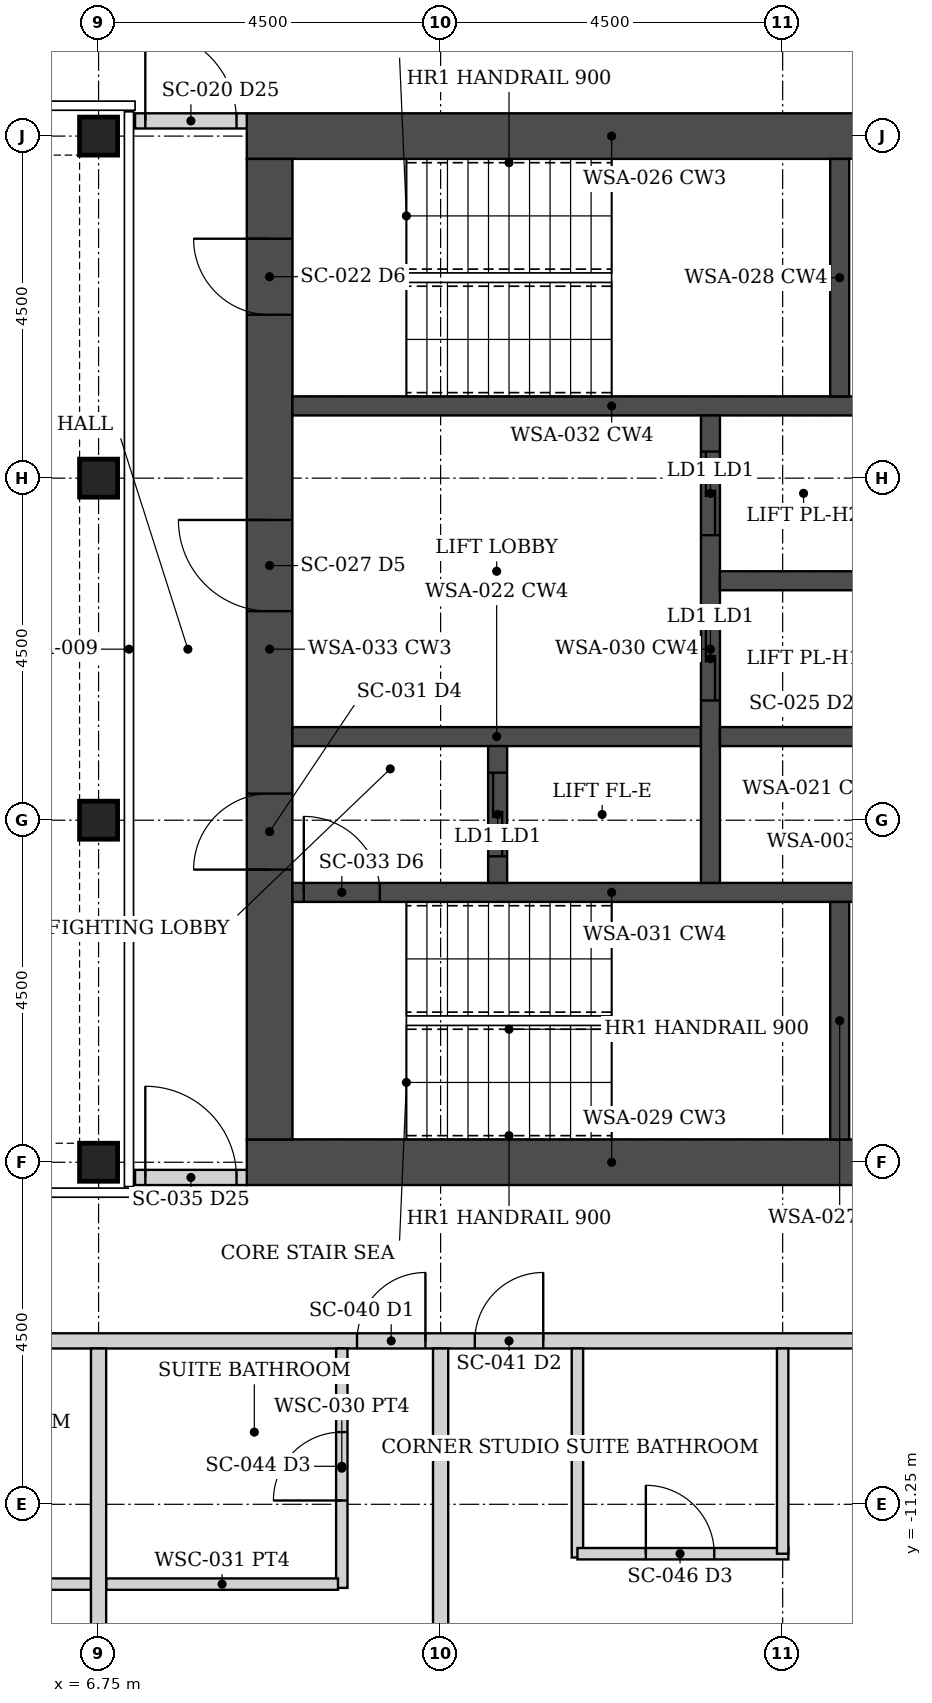
"""IFC4 building model, lengths in metres.
Left out: names, types, materials, properties, quantities, classifications, styles, units other than length and angle.
Written with IfcOpenShell. Run it as: python <this file> out.ifc"""

import sys

from ifc_helpers import new_model, si_unit, direction, frame, frame_2d, origin, origin_2d, place, context, subcontext, project, spatial, rectangle, hollow_rectangle, extrude, element, fill, save


model = new_model("IFC4")
c1 = context("Model", 3, precision=1e-05, world=origin(), true_north=direction((0.0, 1.0)))
c2 = subcontext(c1, "Body", "Model", "MODEL_VIEW")
j1 = project(units=[si_unit("LENGTHUNIT", "METRE"), si_unit("PLANEANGLEUNIT", "RADIAN")], contexts=[c1])
p1 = place(None, origin())
s1 = spatial("IfcSite", under=j1, at=p1, CompositionType="ELEMENT")
p2 = place(p1, origin())
s2 = spatial("IfcBuilding", under=s1, at=p2, CompositionType="ELEMENT")
p3 = place(p2, frame((0.0, 0.0, 223.3)))
s3 = spatial("IfcBuildingStorey", under=s2, at=p3, CompositionType="ELEMENT", Elevation=223.3)
for number, where, z_axis, x_axis in (
    (1, (6.75, -6.75, 0.0), (0.0, 0.0, 1.0), (1.0, 0.0, 0.0)),
    (2, (6.75, -2.25, 0.0), (0.0, 0.0, 1.0), (1.0, 0.0, 0.0)),
    (3, (6.75, 2.25, 0.0), (0.0, 0.0, 1.0), (1.0, 0.0, 0.0)),
    (4, (6.75, 6.75, 0.0), (0.0, 0.0, 1.0), (1.0, 0.0, 0.0)),
):
    element("IfcColumn", number, at=place(p3, frame(where, z_axis=z_axis, x_axis=x_axis)), inside=s3, PredefinedType="COLUMN", context=c2, shape_type="SweptSolid", body=[
        extrude(hollow_rectangle(XDim=0.5, YDim=0.5, WallThickness=0.03, at=origin_2d()), origin(), (0.0, 0.0, 1.0), 3.75),
    ])
for number, where, z_axis, x_axis in (
    (5, (8.7, -6.75, 0.0), (0.0, 0.0, 1.0), (1.0, 0.0, 0.0)),
    (6, (8.7, 6.75, 0.0), (0.0, 0.0, 1.0), (1.0, 0.0, 0.0)),
):
    element("IfcWall", number, at=place(p3, frame(where, z_axis=z_axis, x_axis=x_axis)), inside=s3, PredefinedType="SHEAR", context=c2, shape_type="SweptSolid", body=[
        extrude(rectangle(XDim=9.6, YDim=0.6, at=frame_2d((4.8, 0.0))), origin(), (0.0, 0.0, 1.0), 3.75),
    ])
p4 = place(p3, frame((9.0, -6.45, 0.0), z_axis=(0.0, 0.0, 1.0), x_axis=(0.0, 1.0, 0.0)))
e7 = element("IfcWall", 7, at=p4, inside=s3, PredefinedType="SHEAR", context=c2, shape_type="SweptSolid", body=[
    extrude(rectangle(XDim=12.9, YDim=0.6, at=frame_2d((6.45, 0.0))), origin(), (0.0, 0.0, 1.0), 3.75),
])
p5 = place(p4, frame((3.55, 0.0, 0.0)))
e8 = element("IfcOpeningElement", 8, at=p5, cuts=e7, PredefinedType="OPENING", context=c2, shape_type="SweptSolid", body=[
    extrude(rectangle(XDim=1.0, YDim=2.1, at=frame_2d((0.5, 1.05))), frame((0.0, 0.31, 0.0), z_axis=(0.0, -1.0, 0.0), x_axis=(1.0, 0.0, 0.0)), (0.0, 0.0, 1.0), 0.62),
])
p6 = place(p4, frame((6.95, 0.0, 0.0)))
e9 = element("IfcOpeningElement", 9, at=p6, cuts=e7, PredefinedType="OPENING", context=c2, shape_type="SweptSolid", body=[
    extrude(rectangle(XDim=1.2, YDim=2.1, at=frame_2d((0.6, 1.05))), frame((0.0, 0.31, 0.0), z_axis=(0.0, -1.0, 0.0), x_axis=(1.0, 0.0, 0.0)), (0.0, 0.0, 1.0), 0.62),
])
p7 = place(p4, frame((10.85, 0.0, 0.0)))
e10 = element("IfcOpeningElement", 10, at=p7, cuts=e7, PredefinedType="OPENING", context=c2, shape_type="SweptSolid", body=[
    extrude(rectangle(XDim=1.0, YDim=2.1, at=frame_2d((0.5, 1.05))), frame((0.0, 0.31, 0.0), z_axis=(0.0, -1.0, 0.0), x_axis=(1.0, 0.0, 0.0)), (0.0, 0.0, 1.0), 0.62),
])
p8 = place(p3, frame((9.3, -3.2, 0.0), z_axis=(0.0, 0.0, 1.0), x_axis=(1.0, 0.0, 0.0)))
e11 = element("IfcWall", 11, at=p8, inside=s3, PredefinedType="SHEAR", context=c2, shape_type="SweptSolid", body=[
    extrude(rectangle(XDim=8.4, YDim=0.25, at=frame_2d((4.2, 0.0))), origin(), (0.0, 0.0, 1.0), 3.75),
])
p9 = place(p8, frame((0.15, 0.0, 0.0)))
e12 = element("IfcOpeningElement", 12, at=p9, cuts=e11, PredefinedType="OPENING", context=c2, shape_type="SweptSolid", body=[
    extrude(rectangle(XDim=1.0, YDim=2.1, at=frame_2d((0.5, 1.05))), frame((0.0, 0.135, 0.0), z_axis=(0.0, -1.0, 0.0), x_axis=(1.0, 0.0, 0.0)), (0.0, 0.0, 1.0), 0.27),
])
p10 = place(p3, frame((9.3, 3.2, 0.0), z_axis=(0.0, 0.0, 1.0), x_axis=(1.0, 0.0, 0.0)))
e13 = element("IfcWall", 13, at=p10, inside=s3, PredefinedType="SHEAR", context=c2, shape_type="SweptSolid", body=[
    extrude(rectangle(XDim=8.4, YDim=0.25, at=frame_2d((4.2, 0.0))), origin(), (0.0, 0.0, 1.0), 3.75),
])
for number, where, z_axis, x_axis in (
    (14, (16.5, -6.45, 0.0), (0.0, 0.0, 1.0), (0.0, 1.0, 0.0)),
    (15, (16.5, 3.325, 0.0), (0.0, 0.0, 1.0), (0.0, 1.0, 0.0)),
):
    element("IfcWall", number, at=place(p3, frame(where, z_axis=z_axis, x_axis=x_axis)), inside=s3, PredefinedType="SHEAR", context=c2, shape_type="SweptSolid", body=[
        extrude(rectangle(XDim=3.125, YDim=0.25, at=frame_2d((1.562, 0.0))), origin(), (0.0, 0.0, 1.0), 3.75),
    ])
p11 = place(p3, frame((9.3, -1.15, 0.0), z_axis=(0.0, 0.0, 1.0), x_axis=(1.0, 0.0, 0.0)))
e16 = element("IfcWall", 16, at=p11, inside=s3, PredefinedType="SHEAR", context=c2, shape_type="SweptSolid", body=[
    extrude(rectangle(XDim=5.375, YDim=0.25, at=frame_2d((2.688, 0.0))), origin(), (0.0, 0.0, 1.0), 3.75),
])
p12 = place(p3, frame((12.0, -3.075, 0.0), z_axis=(0.0, 0.0, 1.0), x_axis=(0.0, 1.0, 0.0)))
e17 = element("IfcWall", 17, at=p12, inside=s3, PredefinedType="SHEAR", context=c2, shape_type="SweptSolid", body=[
    extrude(rectangle(XDim=1.8, YDim=0.25, at=frame_2d((0.9, 0.0))), origin(), (0.0, 0.0, 1.0), 3.75),
])
p13 = place(p12, frame((0.35, 0.0, 0.0)))
e18 = element("IfcOpeningElement", 18, at=p13, cuts=e17, PredefinedType="OPENING", context=c2, shape_type="SweptSolid", body=[
    extrude(rectangle(XDim=1.1, YDim=2.1, at=frame_2d((0.55, 1.05))), frame((0.0, 0.135, 0.0), z_axis=(0.0, -1.0, 0.0), x_axis=(1.0, 0.0, 0.0)), (0.0, 0.0, 1.0), 0.27),
])
p14 = place(p3, frame((14.8, -3.075, 0.0), z_axis=(0.0, 0.0, 1.0), x_axis=(0.0, 1.0, 0.0)))
e19 = element("IfcWall", 19, at=p14, inside=s3, PredefinedType="SHEAR", context=c2, shape_type="SweptSolid", body=[
    extrude(rectangle(XDim=6.15, YDim=0.25, at=frame_2d((3.075, 0.0))), origin(), (0.0, 0.0, 1.0), 3.75),
])
p15 = place(p14, frame((2.4, 0.0, 0.0)))
e20 = element("IfcOpeningElement", 20, at=p15, cuts=e19, PredefinedType="OPENING", context=c2, shape_type="SweptSolid", body=[
    extrude(rectangle(XDim=1.1, YDim=2.1, at=frame_2d((0.55, 1.05))), frame((0.0, 0.135, 0.0), z_axis=(0.0, -1.0, 0.0), x_axis=(1.0, 0.0, 0.0)), (0.0, 0.0, 1.0), 0.27),
])
p16 = place(p14, frame((4.575, 0.0, 0.0)))
e21 = element("IfcOpeningElement", 21, at=p16, cuts=e19, PredefinedType="OPENING", context=c2, shape_type="SweptSolid", body=[
    extrude(rectangle(XDim=1.1, YDim=2.1, at=frame_2d((0.55, 1.05))), frame((0.0, 0.135, 0.0), z_axis=(0.0, -1.0, 0.0), x_axis=(1.0, 0.0, 0.0)), (0.0, 0.0, 1.0), 0.27),
])
for number, where, z_axis, x_axis in (
    (22, (14.925, -1.15, 0.0), (0.0, 0.0, 1.0), (1.0, 0.0, 0.0)),
    (23, (14.925, 0.9, 0.0), (0.0, 0.0, 1.0), (1.0, 0.0, 0.0)),
):
    element("IfcWall", number, at=place(p3, frame(where, z_axis=z_axis, x_axis=x_axis)), inside=s3, PredefinedType="SHEAR", context=c2, shape_type="SweptSolid", body=[
        extrude(rectangle(XDim=2.775, YDim=0.25, at=frame_2d((1.387, 0.0))), origin(), (0.0, 0.0, 1.0), 3.75),
    ])
p17 = place(p3, frame((7.23, 6.95, 0.0), z_axis=(0.0, 0.0, 1.0), x_axis=(1.0, 0.0, 0.0)))
e24 = element("IfcWall", 24, at=p17, inside=s3, PredefinedType="PARTITIONING", context=c2, shape_type="SweptSolid", body=[
    extrude(rectangle(XDim=1.47, YDim=0.2, at=frame_2d((0.735, 0.0))), origin(), (0.0, 0.0, 1.0), 2.629),
])
p18 = place(p17, frame((0.135, 0.0, 0.0)))
e25 = element("IfcOpeningElement", 25, at=p18, cuts=e24, PredefinedType="OPENING", context=c2, shape_type="SweptSolid", body=[
    extrude(rectangle(XDim=1.2, YDim=2.1, at=frame_2d((0.6, 1.05))), frame((0.0, 0.11, 0.0), z_axis=(0.0, -1.0, 0.0), x_axis=(1.0, 0.0, 0.0)), (0.0, 0.0, 1.0), 0.22),
])
p19 = place(p3, frame((7.23, -6.95, 0.0), z_axis=(0.0, 0.0, 1.0), x_axis=(1.0, 0.0, 0.0)))
e26 = element("IfcWall", 26, at=p19, inside=s3, PredefinedType="PARTITIONING", context=c2, shape_type="SweptSolid", body=[
    extrude(rectangle(XDim=1.47, YDim=0.2, at=frame_2d((0.735, 0.0))), origin(), (0.0, 0.0, 1.0), 2.629),
])
p20 = place(p19, frame((0.135, 0.0, 0.0)))
e27 = element("IfcOpeningElement", 27, at=p20, cuts=e26, PredefinedType="OPENING", context=c2, shape_type="SweptSolid", body=[
    extrude(rectangle(XDim=1.2, YDim=2.1, at=frame_2d((0.6, 1.05))), frame((0.0, 0.11, 0.0), z_axis=(0.0, -1.0, 0.0), x_axis=(1.0, 0.0, 0.0)), (0.0, 0.0, 1.0), 0.22),
])
p21 = place(p3, frame((-20.05, -9.1, 0.0), z_axis=(0.0, 0.0, 1.0), x_axis=(1.0, 0.0, 0.0)))
e28 = element("IfcWall", 28, at=p21, inside=s3, PredefinedType="PARTITIONING", context=c2, shape_type="SweptSolid", body=[
    extrude(rectangle(XDim=40.1, YDim=0.2, at=frame_2d((20.05, 0.0))), origin(), (0.0, 0.0, 1.0), 2.629),
])
p22 = place(p21, frame((13.6, 0.0, 0.0)))
e29 = element("IfcOpeningElement", 29, at=p22, cuts=e28, PredefinedType="OPENING", context=c2, shape_type="SweptSolid", body=[
    extrude(rectangle(XDim=0.9, YDim=2.1, at=frame_2d((0.45, 1.05))), frame((0.0, 0.11, 0.0), z_axis=(0.0, -1.0, 0.0), x_axis=(1.0, 0.0, 0.0)), (0.0, 0.0, 1.0), 0.22),
])
p23 = place(p21, frame((21.2, 0.0, 0.0)))
e30 = element("IfcOpeningElement", 30, at=p23, cuts=e28, PredefinedType="OPENING", context=c2, shape_type="SweptSolid", body=[
    extrude(rectangle(XDim=0.9, YDim=2.1, at=frame_2d((0.45, 1.05))), frame((0.0, 0.11, 0.0), z_axis=(0.0, -1.0, 0.0), x_axis=(1.0, 0.0, 0.0)), (0.0, 0.0, 1.0), 0.22),
])
p24 = place(p21, frame((22.5, 0.0, 0.0)))
e31 = element("IfcOpeningElement", 31, at=p24, cuts=e28, PredefinedType="OPENING", context=c2, shape_type="SweptSolid", body=[
    extrude(rectangle(XDim=0.9, YDim=2.1, at=frame_2d((0.45, 1.05))), frame((0.0, 0.11, 0.0), z_axis=(0.0, -1.0, 0.0), x_axis=(1.0, 0.0, 0.0)), (0.0, 0.0, 1.0), 0.22),
])
p25 = place(p21, frame((30.2, 0.0, 0.0)))
e32 = element("IfcOpeningElement", 32, at=p25, cuts=e28, PredefinedType="OPENING", context=c2, shape_type="SweptSolid", body=[
    extrude(rectangle(XDim=0.9, YDim=2.1, at=frame_2d((0.45, 1.05))), frame((0.0, 0.11, 0.0), z_axis=(0.0, -1.0, 0.0), x_axis=(1.0, 0.0, 0.0)), (0.0, 0.0, 1.0), 0.22),
])
p26 = place(p21, frame((31.75, 0.0, 0.0)))
e33 = element("IfcOpeningElement", 33, at=p26, cuts=e28, PredefinedType="OPENING", context=c2, shape_type="SweptSolid", body=[
    extrude(rectangle(XDim=0.9, YDim=2.1, at=frame_2d((0.45, 1.05))), frame((0.0, 0.11, 0.0), z_axis=(0.0, -1.0, 0.0), x_axis=(1.0, 0.0, 0.0)), (0.0, 0.0, 1.0), 0.22),
])
p27 = place(p21, frame((7.45, 0.0, 0.0)))
e34 = element("IfcOpeningElement", 34, at=p27, cuts=e28, PredefinedType="OPENING", context=c2, shape_type="SweptSolid", body=[
    extrude(rectangle(XDim=0.9, YDim=2.1, at=frame_2d((0.45, 1.05))), frame((0.0, 0.11, 0.0), z_axis=(0.0, -1.0, 0.0), x_axis=(1.0, 0.0, 0.0)), (0.0, 0.0, 1.0), 0.22),
])
p28 = place(p3, frame((3.6, -12.3, 0.0), z_axis=(0.0, 0.0, 1.0), x_axis=(1.0, 0.0, 0.0)))
e35 = element("IfcWall", 35, at=p28, inside=s3, PredefinedType="PARTITIONING", context=c2, shape_type="SweptSolid", body=[
    extrude(rectangle(XDim=3.05, YDim=0.15, at=frame_2d((1.525, 0.0))), origin(), (0.0, 0.0, 1.0), 2.629),
])
p29 = place(p3, frame((9.95, -12.35, 0.0), z_axis=(0.0, 0.0, 1.0), x_axis=(0.0, 1.0, 0.0)))
e36 = element("IfcWall", 36, at=p29, inside=s3, PredefinedType="PARTITIONING", context=c2, shape_type="SweptSolid", body=[
    extrude(rectangle(XDim=3.15, YDim=0.15, at=frame_2d((1.575, 0.0))), origin(), (0.0, 0.0, 1.0), 2.629),
])
p30 = place(p29, frame((1.15, 0.0, 0.0)))
e37 = element("IfcOpeningElement", 37, at=p30, cuts=e36, PredefinedType="OPENING", context=c2, shape_type="SweptSolid", body=[
    extrude(rectangle(XDim=0.9, YDim=2.1, at=frame_2d((0.45, 1.05))), frame((0.0, 0.085, 0.0), z_axis=(0.0, -1.0, 0.0), x_axis=(1.0, 0.0, 0.0)), (0.0, 0.0, 1.0), 0.17),
])
p31 = place(p3, frame((6.85, -12.3, 0.0), z_axis=(0.0, 0.0, 1.0), x_axis=(1.0, 0.0, 0.0)))
e38 = element("IfcWall", 38, at=p31, inside=s3, PredefinedType="PARTITIONING", context=c2, shape_type="SweptSolid", body=[
    extrude(rectangle(XDim=3.05, YDim=0.15, at=frame_2d((1.525, 0.0))), origin(), (0.0, 0.0, 1.0), 2.629),
])
for number, where, z_axis, x_axis in (
    (39, (6.75, -19.9, 0.0), (0.0, 0.0, 1.0), (0.0, 1.0, 0.0)),
    (40, (11.25, -19.9, 0.0), (0.0, 0.0, 1.0), (0.0, 1.0, 0.0)),
):
    element("IfcWall", number, at=place(p3, frame(where, z_axis=z_axis, x_axis=x_axis)), inside=s3, PredefinedType="PARTITIONING", context=c2, shape_type="SweptSolid", body=[
        extrude(rectangle(XDim=10.7, YDim=0.2, at=frame_2d((5.35, 0.0))), origin(), (0.0, 0.0, 1.0), 2.629),
    ])
p32 = place(p3, frame((13.05, -11.95, 0.0), z_axis=(0.0, 0.0, 1.0), x_axis=(0.0, 1.0, 0.0)))
e41 = element("IfcWall", 41, at=p32, inside=s3, PredefinedType="PARTITIONING", context=c2, shape_type="SweptSolid", body=[
    extrude(rectangle(XDim=2.75, YDim=0.15, at=frame_2d((1.375, 0.0))), origin(), (0.0, 0.0, 1.0), 2.629),
])
p33 = place(p3, frame((13.05, -11.9, 0.0), z_axis=(0.0, 0.0, 1.0), x_axis=(1.0, 0.0, 0.0)))
e42 = element("IfcWall", 42, at=p33, inside=s3, PredefinedType="PARTITIONING", context=c2, shape_type="SweptSolid", body=[
    extrude(rectangle(XDim=2.775, YDim=0.15, at=frame_2d((1.387, 0.0))), origin(), (0.0, 0.0, 1.0), 2.629),
])
p34 = place(p33, frame((0.9, 0.0, 0.0)))
e43 = element("IfcOpeningElement", 43, at=p34, cuts=e42, PredefinedType="OPENING", context=c2, shape_type="SweptSolid", body=[
    extrude(rectangle(XDim=0.9, YDim=2.1, at=frame_2d((0.45, 1.05))), frame((0.0, 0.085, 0.0), z_axis=(0.0, -1.0, 0.0), x_axis=(1.0, 0.0, 0.0)), (0.0, 0.0, 1.0), 0.17),
])
p35 = place(p3, frame((15.75, -11.9, 0.0), z_axis=(0.0, 0.0, 1.0), x_axis=(0.0, 1.0, 0.0)))
e44 = element("IfcWall", 44, at=p35, inside=s3, PredefinedType="PARTITIONING", context=c2, shape_type="SweptSolid", body=[
    extrude(rectangle(XDim=2.7, YDim=0.15, at=frame_2d((1.35, 0.0))), origin(), (0.0, 0.0, 1.0), 2.629),
])
p36 = place(p18, origin())
e45 = element("IfcDoor", 45, at=p36, inside=s3, OperationType="DOUBLE_DOOR_DOUBLE_SWING", PredefinedType="DOOR", context=c2, shape_type="SweptSolid", body=[
    extrude(rectangle(XDim=1.2, YDim=2.1, at=frame_2d((0.6, 1.05))), frame((0.0, 0.025, 0.0), z_axis=(0.0, -1.0, 0.0), x_axis=(1.0, 0.0, 0.0)), (0.0, 0.0, 1.0), 0.05),
])
fill(e25, e45)
p37 = place(p20, origin())
e46 = element("IfcDoor", 46, at=p37, inside=s3, OperationType="DOUBLE_DOOR_DOUBLE_SWING", PredefinedType="DOOR", context=c2, shape_type="SweptSolid", body=[
    extrude(rectangle(XDim=1.2, YDim=2.1, at=frame_2d((0.6, 1.05))), frame((0.0, 0.025, 0.0), z_axis=(0.0, -1.0, 0.0), x_axis=(1.0, 0.0, 0.0)), (0.0, 0.0, 1.0), 0.05),
])
fill(e27, e46)
p38 = place(p25, origin())
e47 = element("IfcDoor", 47, at=p38, inside=s3, OperationType="SINGLE_SWING_RIGHT", PredefinedType="DOOR", context=c2, shape_type="SweptSolid", body=[
    extrude(rectangle(XDim=0.9, YDim=2.1, at=frame_2d((0.45, 1.05))), frame((0.0, 0.025, 0.0), z_axis=(0.0, -1.0, 0.0), x_axis=(1.0, 0.0, 0.0)), (0.0, 0.0, 1.0), 0.05),
])
fill(e32, e47)
p39 = place(p30, origin())
e48 = element("IfcDoor", 48, at=p39, inside=s3, OperationType="SINGLE_SWING_LEFT", PredefinedType="DOOR", context=c2, shape_type="SweptSolid", body=[
    extrude(rectangle(XDim=0.9, YDim=2.1, at=frame_2d((0.45, 1.05))), frame((0.0, 0.025, 0.0), z_axis=(0.0, -1.0, 0.0), x_axis=(1.0, 0.0, 0.0)), (0.0, 0.0, 1.0), 0.05),
])
fill(e37, e48)
p40 = place(p26, origin())
e49 = element("IfcDoor", 49, at=p40, inside=s3, OperationType="SINGLE_SWING_RIGHT", PredefinedType="DOOR", context=c2, shape_type="SweptSolid", body=[
    extrude(rectangle(XDim=0.9, YDim=2.1, at=frame_2d((0.45, 1.05))), frame((0.0, 0.025, 0.0), z_axis=(0.0, -1.0, 0.0), x_axis=(1.0, 0.0, 0.0)), (0.0, 0.0, 1.0), 0.05),
])
fill(e33, e49)
p41 = place(p34, origin())
e50 = element("IfcDoor", 50, at=p41, inside=s3, OperationType="SINGLE_SWING_LEFT", PredefinedType="DOOR", context=c2, shape_type="SweptSolid", body=[
    extrude(rectangle(XDim=0.9, YDim=2.1, at=frame_2d((0.45, 1.05))), frame((0.0, 0.025, 0.0), z_axis=(0.0, -1.0, 0.0), x_axis=(1.0, 0.0, 0.0)), (0.0, 0.0, 1.0), 0.05),
])
fill(e43, e50)
p42 = place(p5, origin())
e51 = element("IfcDoor", 51, at=p42, inside=s3, OperationType="SINGLE_SWING_LEFT", PredefinedType="DOOR", context=c2, shape_type="SweptSolid", body=[
    extrude(rectangle(XDim=1.0, YDim=2.1, at=frame_2d((0.5, 1.05))), frame((0.0, 0.025, 0.0), z_axis=(0.0, -1.0, 0.0), x_axis=(1.0, 0.0, 0.0)), (0.0, 0.0, 1.0), 0.05),
])
fill(e8, e51)
p43 = place(p9, origin())
e52 = element("IfcDoor", 52, at=p43, inside=s3, OperationType="SINGLE_SWING_LEFT", PredefinedType="DOOR", context=c2, shape_type="SweptSolid", body=[
    extrude(rectangle(XDim=1.0, YDim=2.1, at=frame_2d((0.5, 1.05))), frame((0.0, 0.025, 0.0), z_axis=(0.0, -1.0, 0.0), x_axis=(1.0, 0.0, 0.0)), (0.0, 0.0, 1.0), 0.05),
])
fill(e12, e52)
p44 = place(p6, origin())
e53 = element("IfcDoor", 53, at=p44, inside=s3, OperationType="SINGLE_SWING_RIGHT", PredefinedType="DOOR", context=c2, shape_type="SweptSolid", body=[
    extrude(rectangle(XDim=1.2, YDim=2.1, at=frame_2d((0.6, 1.05))), frame((0.0, 0.025, 0.0), z_axis=(0.0, -1.0, 0.0), x_axis=(1.0, 0.0, 0.0)), (0.0, 0.0, 1.0), 0.05),
])
fill(e9, e53)
p45 = place(p7, origin())
e54 = element("IfcDoor", 54, at=p45, inside=s3, OperationType="SINGLE_SWING_RIGHT", PredefinedType="DOOR", context=c2, shape_type="SweptSolid", body=[
    extrude(rectangle(XDim=1.0, YDim=2.1, at=frame_2d((0.5, 1.05))), frame((0.0, 0.025, 0.0), z_axis=(0.0, -1.0, 0.0), x_axis=(1.0, 0.0, 0.0)), (0.0, 0.0, 1.0), 0.05),
])
fill(e10, e54)
p46 = place(p13, origin())
e55 = element("IfcDoor", 55, at=p46, inside=s3, OperationType="DOUBLE_DOOR_SLIDING", PredefinedType="DOOR", context=c2, shape_type="SweptSolid", body=[
    extrude(rectangle(XDim=1.1, YDim=2.1, at=frame_2d((0.55, 1.05))), frame((0.0, 0.025, 0.0), z_axis=(0.0, -1.0, 0.0), x_axis=(1.0, 0.0, 0.0)), (0.0, 0.0, 1.0), 0.05),
])
fill(e18, e55)
p47 = place(p15, origin())
e56 = element("IfcDoor", 56, at=p47, inside=s3, OperationType="DOUBLE_DOOR_SLIDING", PredefinedType="DOOR", context=c2, shape_type="SweptSolid", body=[
    extrude(rectangle(XDim=1.1, YDim=2.1, at=frame_2d((0.55, 1.05))), frame((0.0, 0.025, 0.0), z_axis=(0.0, -1.0, 0.0), x_axis=(1.0, 0.0, 0.0)), (0.0, 0.0, 1.0), 0.05),
])
fill(e20, e56)
p48 = place(p16, origin())
e57 = element("IfcDoor", 57, at=p48, inside=s3, OperationType="DOUBLE_DOOR_SLIDING", PredefinedType="DOOR", context=c2, shape_type="SweptSolid", body=[
    extrude(rectangle(XDim=1.1, YDim=2.1, at=frame_2d((0.55, 1.05))), frame((0.0, 0.025, 0.0), z_axis=(0.0, -1.0, 0.0), x_axis=(1.0, 0.0, 0.0)), (0.0, 0.0, 1.0), 0.05),
])
fill(e21, e57)
save(model, sys.argv[1])
